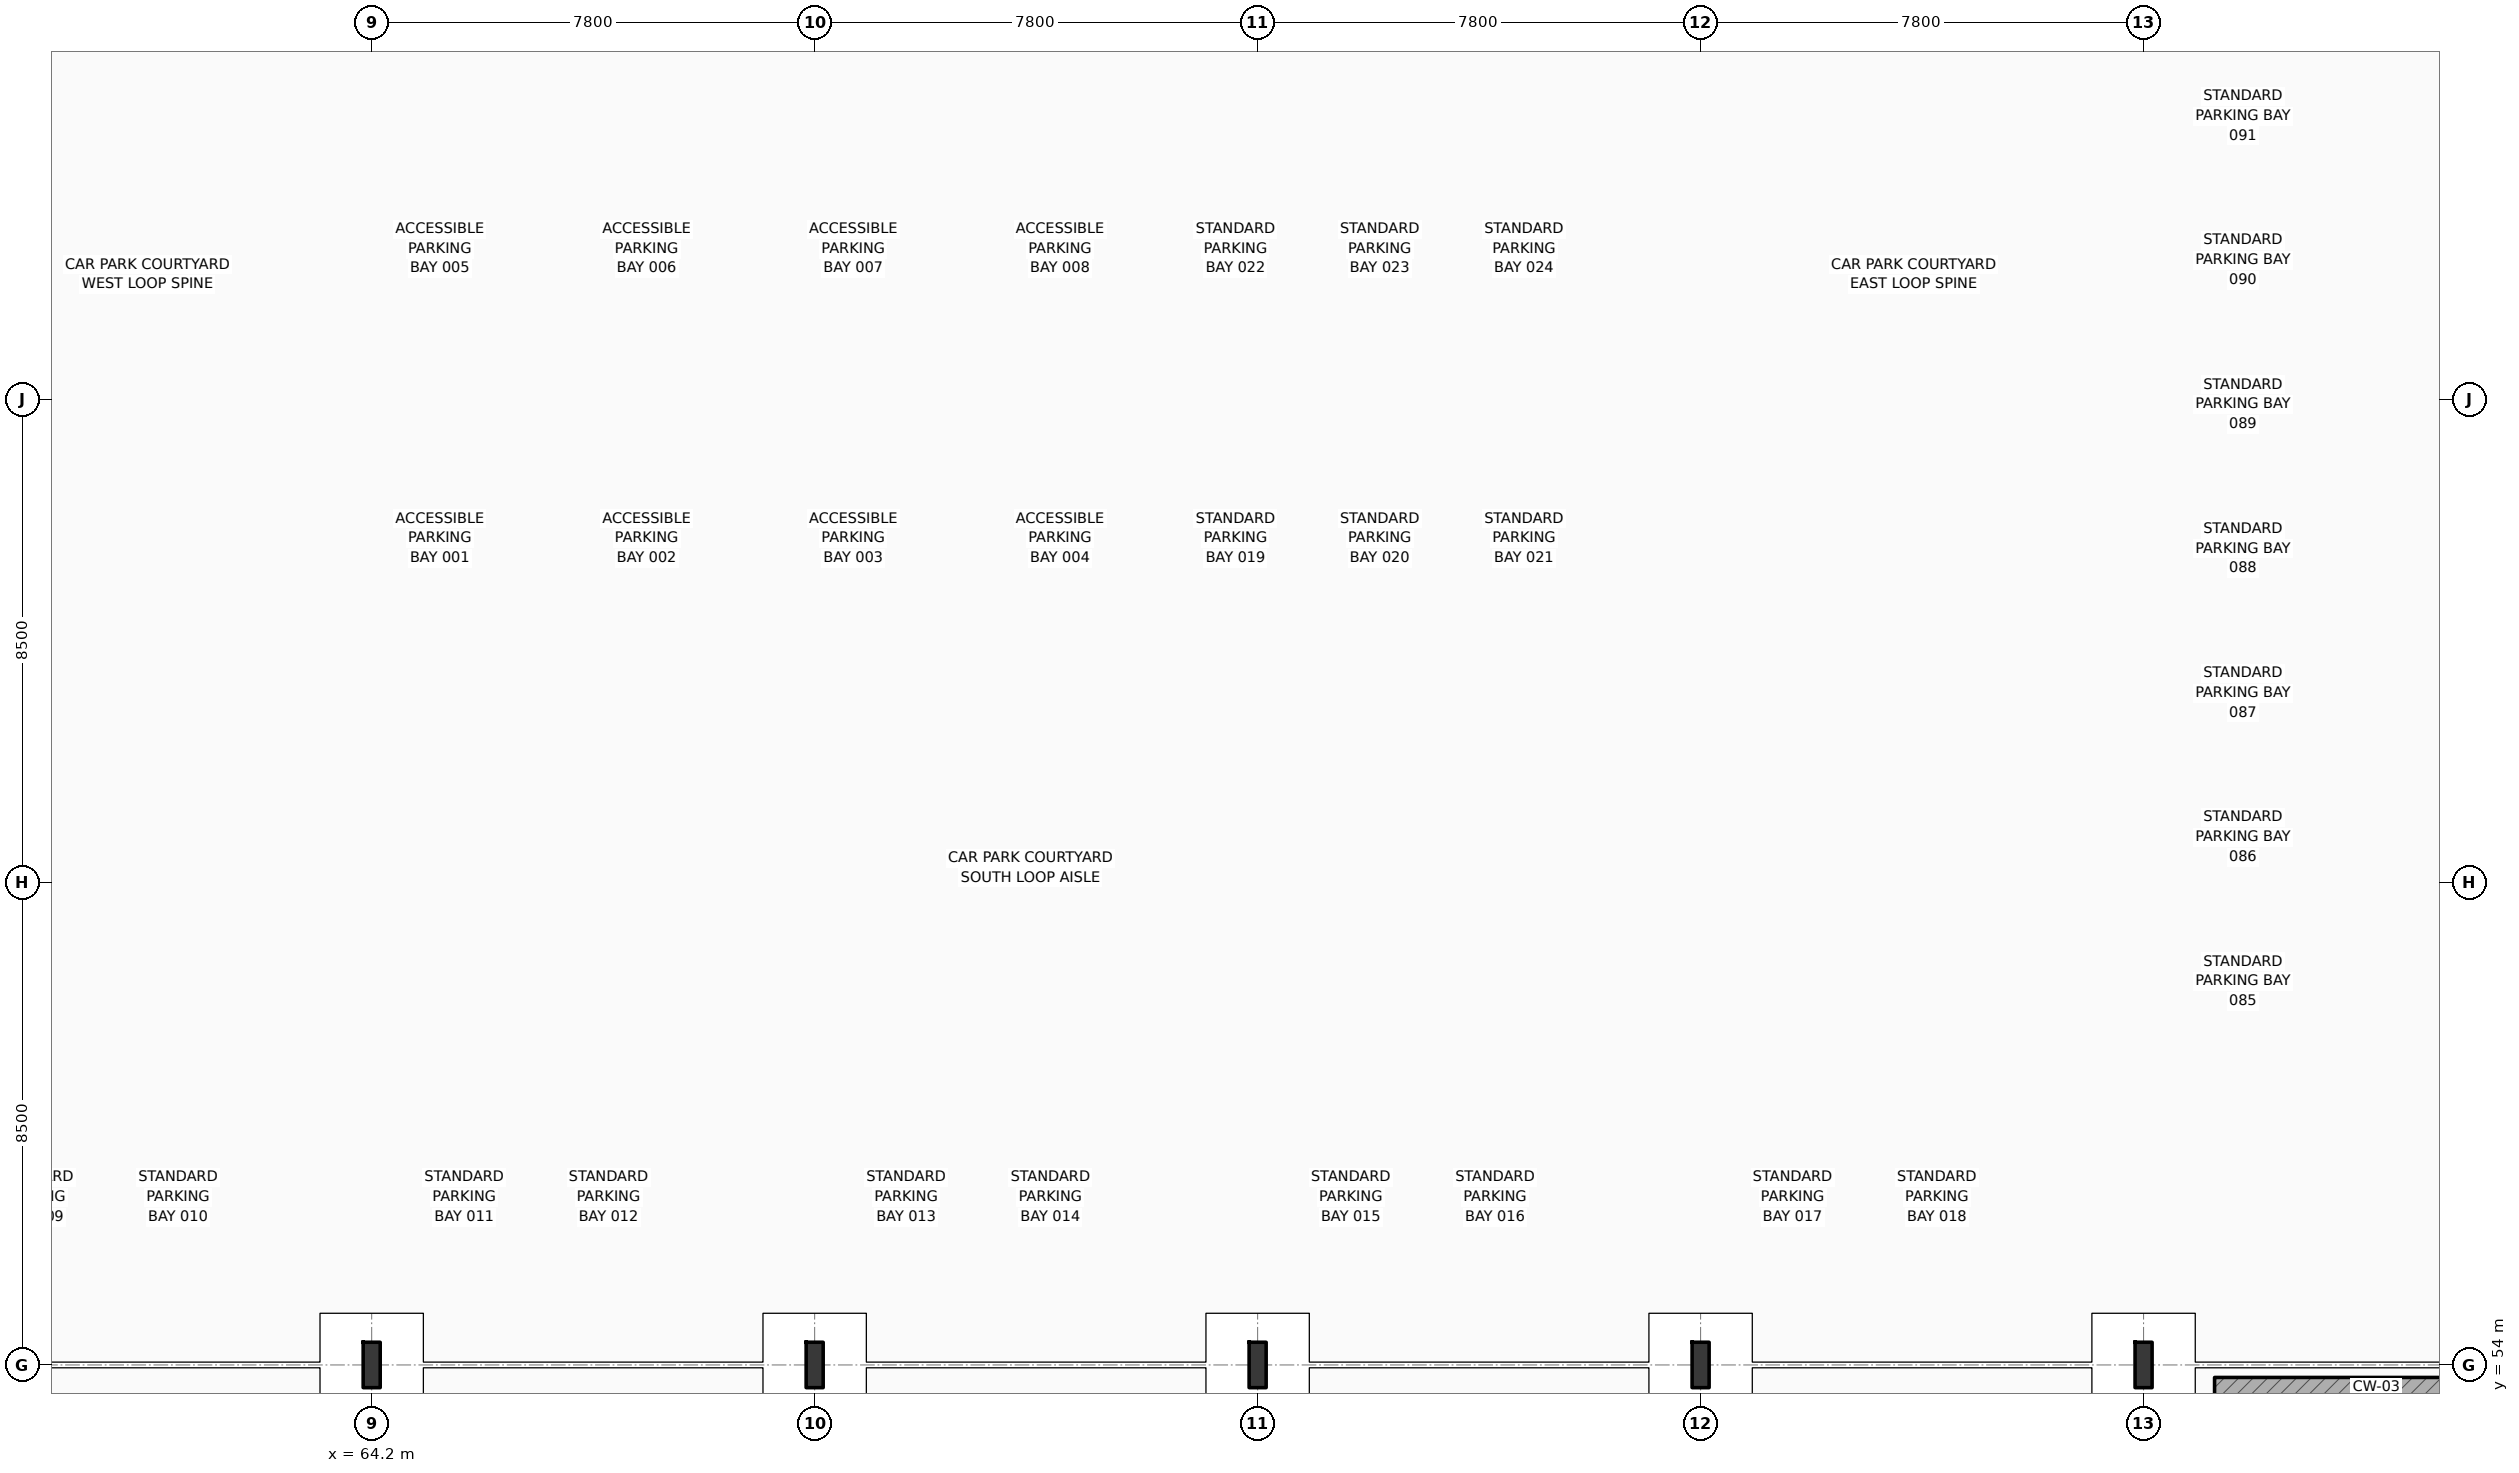
"""IFC4 building model, lengths in metres.
Left out: names, types, materials, properties, quantities, classifications, styles, units other than length and angle.
Written with IfcOpenShell. Run it as: python <this file> out.ifc"""

import sys

from ifc_helpers import new_model, si_unit, direction, frame, frame_2d, origin, origin_2d, place, context, subcontext, project, spatial, rectangle, i_section, extrude, element, save


model = new_model("IFC4")
c1 = context("Model", 3, precision=1e-05, world=origin(), true_north=direction((0.0, 1.0)))
c2 = subcontext(c1, "Body", "Model", "MODEL_VIEW")
j1 = project(units=[si_unit("LENGTHUNIT", "METRE"), si_unit("PLANEANGLEUNIT", "RADIAN")], contexts=[c1])
p1 = place(None, origin())
s1 = spatial("IfcSite", under=j1, at=p1, CompositionType="ELEMENT")
p2 = place(p1, origin())
s2 = spatial("IfcBuilding", under=s1, at=p2, CompositionType="ELEMENT")
p3 = place(p2, frame((0.0, 0.0, -4.5)))
s3 = spatial("IfcBuildingStorey", under=s2, at=p3, CompositionType="ELEMENT", Elevation=-4.5)
for number, where, z_axis, x_axis in (
    (1, (64.2, 54.0, 0.0), (0.0, 0.0, 1.0), (1.0, 0.0, 0.0)),
    (2, (72.0, 54.0, 0.0), (0.0, 0.0, 1.0), (1.0, 0.0, 0.0)),
    (3, (79.8, 54.0, 0.0), (0.0, 0.0, 1.0), (1.0, 0.0, 0.0)),
    (4, (87.6, 54.0, 0.0), (0.0, 0.0, 1.0), (1.0, 0.0, 0.0)),
    (5, (95.4, 54.0, 0.0), (0.0, 0.0, 1.0), (1.0, 0.0, 0.0)),
):
    element("IfcColumn", number, at=place(p3, frame(where, z_axis=z_axis, x_axis=x_axis)), inside=s3, PredefinedType="COLUMN", context=c2, shape_type="SweptSolid", body=[
        extrude(i_section(OverallWidth=0.3, OverallDepth=0.8, WebThickness=0.018, FlangeThickness=0.033, FilletRadius=0.03, at=origin_2d()), origin(), (0.0, 0.0, 1.0), 4.5),
    ])
p4 = place(p3, frame((96.65, 53.605, 0.0), z_axis=(0.0, 0.0, 1.0), x_axis=(1.0, 0.0, 0.0)))
e6 = element("IfcWall", 6, at=p4, inside=s3, PredefinedType="SHEAR", context=c2, shape_type="SweptSolid", body=[
    extrude(rectangle(XDim=5.1, YDim=0.35, at=frame_2d((2.55, 0.0))), origin(), (0.0, 0.0, 1.0), 4.5),
])
save(model, sys.argv[1])
